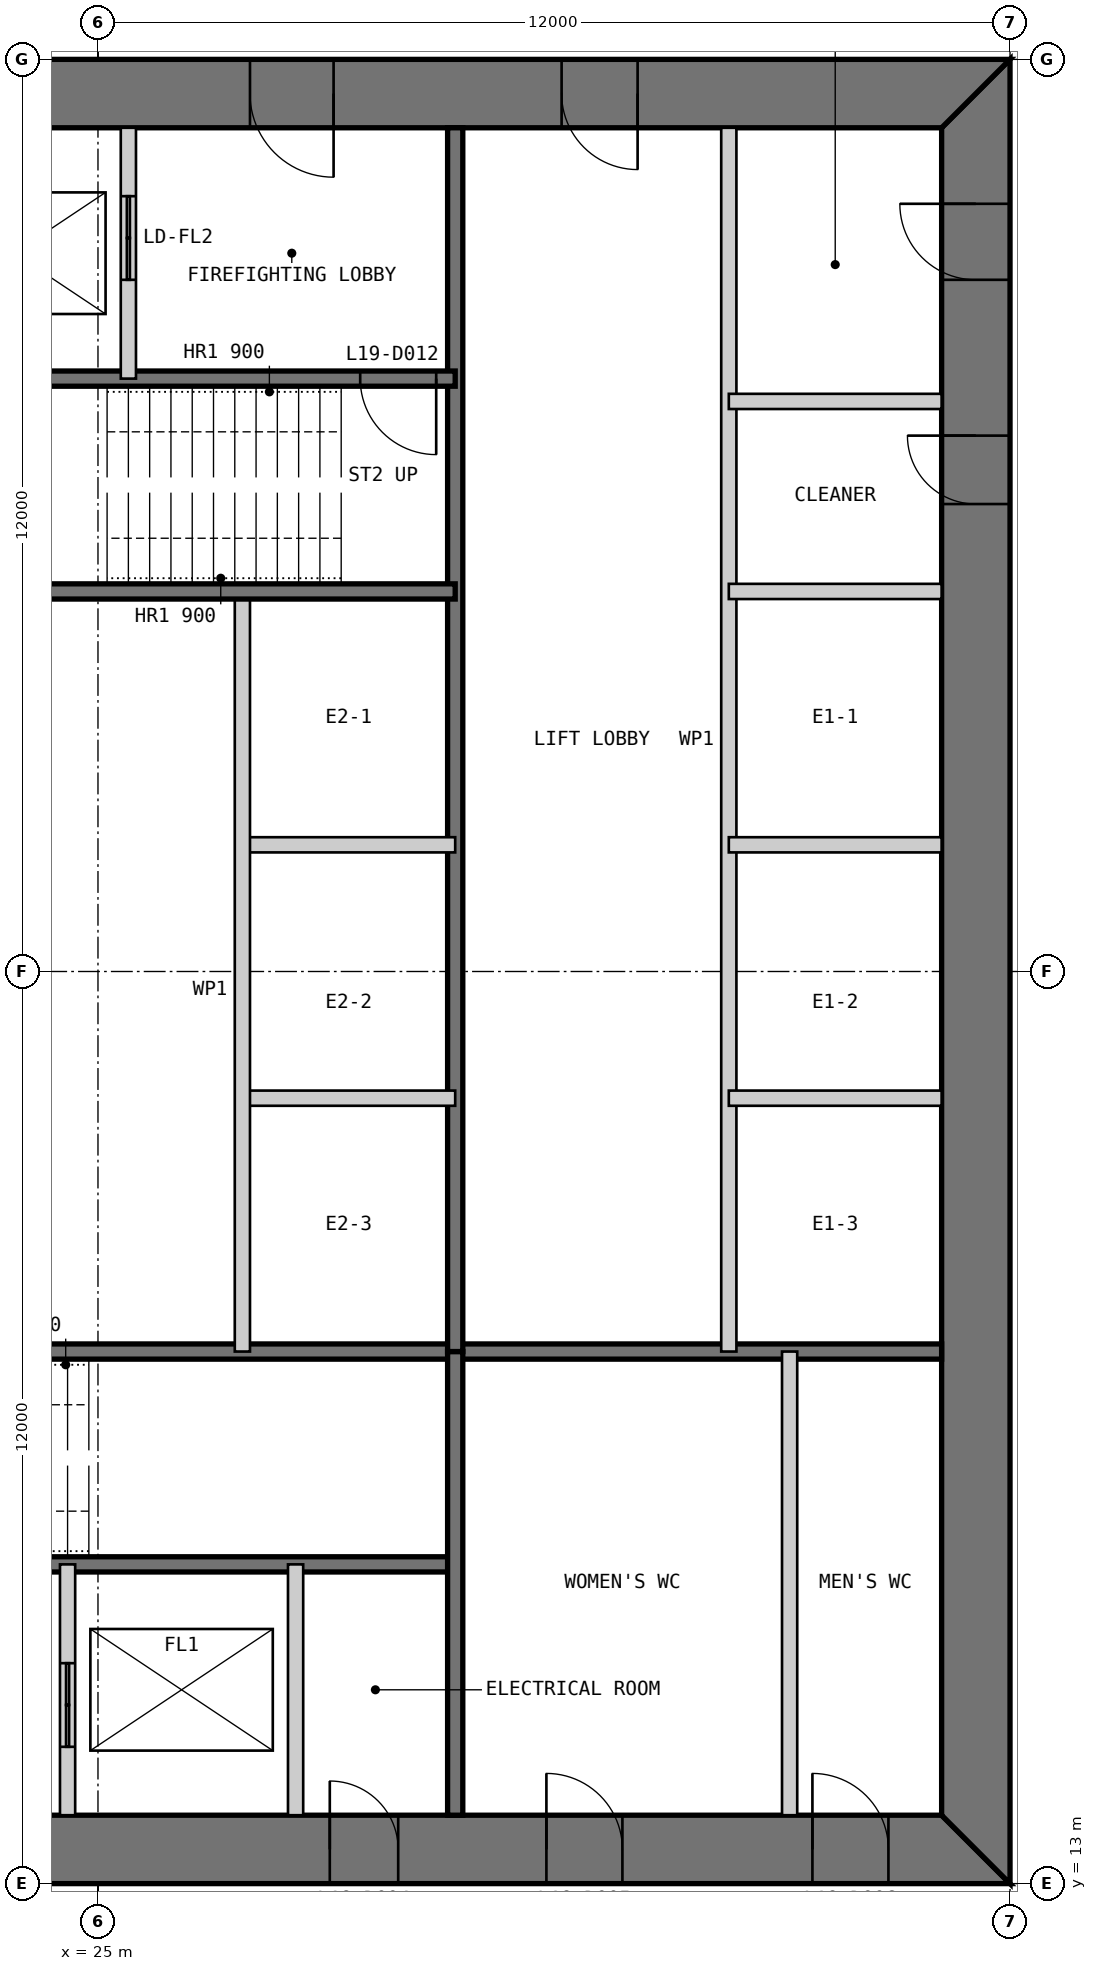
"""IFC4 building model, lengths in metres.
Left out: names, types, materials, properties, quantities, classifications, styles, units other than length and angle.
Written with IfcOpenShell. Run it as: python <this file> out.ifc"""

import sys

from ifc_helpers import new_model, si_unit, direction, frame, frame_2d, origin, place, context, subcontext, project, spatial, polyline, rectangle, outline, extrude, element, fill, save


model = new_model("IFC4")
c1 = context("Model", 3, precision=1e-05, world=origin(), true_north=direction((0.0, 1.0)))
c2 = subcontext(c1, "Body", "Model", "MODEL_VIEW")
j1 = project(units=[si_unit("LENGTHUNIT", "METRE"), si_unit("PLANEANGLEUNIT", "RADIAN")], contexts=[c1])
p1 = place(None, origin())
s1 = spatial("IfcSite", under=j1, at=p1, CompositionType="ELEMENT")
p2 = place(p1, origin())
s2 = spatial("IfcBuilding", under=s1, at=p2, CompositionType="ELEMENT")
p3 = place(p2, frame((0.0, 0.0, 83.0)))
s3 = spatial("IfcBuildingStorey", under=s2, at=p3, CompositionType="ELEMENT", Elevation=83.0)
p4 = place(p3, frame((13.0, 13.45, 0.0), z_axis=(0.0, 0.0, 1.0), x_axis=(1.0, 0.0, 0.0)))
e1 = element("IfcWall", 1, at=p4, inside=s3, PredefinedType="SHEAR", context=c2, shape_type="SweptSolid", body=[
    extrude(outline(polyline([(0.0, -0.45), (24.0, -0.45), (23.1, 0.45), (0.9, 0.45), (0.0, -0.45)])), origin(), (0.0, 0.0, 1.0), 4.0),
])
p5 = place(p4, frame((4.9, 0.0, 0.0)))
e2 = element("IfcOpeningElement", 2, at=p5, cuts=e1, PredefinedType="OPENING", context=c2, shape_type="SweptSolid", body=[
    extrude(rectangle(XDim=1.0, YDim=2.2, at=frame_2d((0.5, 1.1))), frame((0.0, 0.46, 0.0), z_axis=(0.0, -1.0, 0.0), x_axis=(1.0, 0.0, 0.0)), (0.0, 0.0, 1.0), 0.92),
])
p6 = place(p4, frame((8.9, 0.0, 0.0)))
e3 = element("IfcOpeningElement", 3, at=p6, cuts=e1, PredefinedType="OPENING", context=c2, shape_type="SweptSolid", body=[
    extrude(rectangle(XDim=1.1, YDim=2.2, at=frame_2d((0.55, 1.1))), frame((0.0, 0.46, 0.0), z_axis=(0.0, -1.0, 0.0), x_axis=(1.0, 0.0, 0.0)), (0.0, 0.0, 1.0), 0.92),
])
p7 = place(p4, frame((15.05, 0.0, 0.0)))
e4 = element("IfcOpeningElement", 4, at=p7, cuts=e1, PredefinedType="OPENING", context=c2, shape_type="SweptSolid", body=[
    extrude(rectangle(XDim=0.9, YDim=2.2, at=frame_2d((0.45, 1.1))), frame((0.0, 0.46, 0.0), z_axis=(0.0, -1.0, 0.0), x_axis=(1.0, 0.0, 0.0)), (0.0, 0.0, 1.0), 0.92),
])
p8 = place(p4, frame((17.9, 0.0, 0.0)))
e5 = element("IfcOpeningElement", 5, at=p8, cuts=e1, PredefinedType="OPENING", context=c2, shape_type="SweptSolid", body=[
    extrude(rectangle(XDim=1.0, YDim=2.2, at=frame_2d((0.5, 1.1))), frame((0.0, 0.46, 0.0), z_axis=(0.0, -1.0, 0.0), x_axis=(1.0, 0.0, 0.0)), (0.0, 0.0, 1.0), 0.92),
])
p9 = place(p4, frame((21.4, 0.0, 0.0)))
e6 = element("IfcOpeningElement", 6, at=p9, cuts=e1, PredefinedType="OPENING", context=c2, shape_type="SweptSolid", body=[
    extrude(rectangle(XDim=1.0, YDim=2.2, at=frame_2d((0.5, 1.1))), frame((0.0, 0.46, 0.0), z_axis=(0.0, -1.0, 0.0), x_axis=(1.0, 0.0, 0.0)), (0.0, 0.0, 1.0), 0.92),
])
p10 = place(p3, frame((36.55, 13.9, 0.0), z_axis=(0.0, 0.0, 1.0), x_axis=(0.0, 1.0, 0.0)))
e7 = element("IfcWall", 7, at=p10, inside=s3, PredefinedType="SHEAR", context=c2, shape_type="SweptSolid", body=[
    extrude(outline(polyline([(-0.9, -0.45), (23.1, -0.45), (22.2, 0.45), (0.0, 0.45), (-0.9, -0.45)])), origin(), (0.0, 0.0, 1.0), 4.0),
])
p11 = place(p10, frame((20.2, 0.0, 0.0)))
e8 = element("IfcOpeningElement", 8, at=p11, cuts=e7, PredefinedType="OPENING", context=c2, shape_type="SweptSolid", body=[
    extrude(rectangle(XDim=1.0, YDim=2.2, at=frame_2d((0.5, 1.1))), frame((0.0, 0.46, 0.0), z_axis=(0.0, -1.0, 0.0), x_axis=(1.0, 0.0, 0.0)), (0.0, 0.0, 1.0), 0.92),
])
p12 = place(p10, frame((17.25, 0.0, 0.0)))
e9 = element("IfcOpeningElement", 9, at=p12, cuts=e7, PredefinedType="OPENING", context=c2, shape_type="SweptSolid", body=[
    extrude(rectangle(XDim=0.9, YDim=2.2, at=frame_2d((0.45, 1.1))), frame((0.0, 0.46, 0.0), z_axis=(0.0, -1.0, 0.0), x_axis=(1.0, 0.0, 0.0)), (0.0, 0.0, 1.0), 0.92),
])
p13 = place(p3, frame((37.0, 36.55, 0.0), z_axis=(0.0, 0.0, 1.0), x_axis=(-1.0, 0.0, 0.0)))
e10 = element("IfcWall", 10, at=p13, inside=s3, PredefinedType="SHEAR", context=c2, shape_type="SweptSolid", body=[
    extrude(outline(polyline([(0.0, -0.45), (24.0, -0.45), (23.1, 0.45), (0.9, 0.45), (0.0, -0.45)])), origin(), (0.0, 0.0, 1.0), 4.0),
])
p14 = place(p13, frame((4.9, 0.0, 0.0)))
e11 = element("IfcOpeningElement", 11, at=p14, cuts=e10, PredefinedType="OPENING", context=c2, shape_type="SweptSolid", body=[
    extrude(rectangle(XDim=1.0, YDim=2.2, at=frame_2d((0.5, 1.1))), frame((0.0, 0.46, 0.0), z_axis=(0.0, -1.0, 0.0), x_axis=(1.0, 0.0, 0.0)), (0.0, 0.0, 1.0), 0.92),
])
p15 = place(p13, frame((8.9, 0.0, 0.0)))
e12 = element("IfcOpeningElement", 12, at=p15, cuts=e10, PredefinedType="OPENING", context=c2, shape_type="SweptSolid", body=[
    extrude(rectangle(XDim=1.1, YDim=2.2, at=frame_2d((0.55, 1.1))), frame((0.0, 0.46, 0.0), z_axis=(0.0, -1.0, 0.0), x_axis=(1.0, 0.0, 0.0)), (0.0, 0.0, 1.0), 0.92),
])
p16 = place(p13, frame((15.05, 0.0, 0.0)))
e13 = element("IfcOpeningElement", 13, at=p16, cuts=e10, PredefinedType="OPENING", context=c2, shape_type="SweptSolid", body=[
    extrude(rectangle(XDim=0.9, YDim=2.2, at=frame_2d((0.45, 1.1))), frame((0.0, 0.46, 0.0), z_axis=(0.0, -1.0, 0.0), x_axis=(1.0, 0.0, 0.0)), (0.0, 0.0, 1.0), 0.92),
])
p17 = place(p13, frame((17.9, 0.0, 0.0)))
e14 = element("IfcOpeningElement", 14, at=p17, cuts=e10, PredefinedType="OPENING", context=c2, shape_type="SweptSolid", body=[
    extrude(rectangle(XDim=1.0, YDim=2.2, at=frame_2d((0.5, 1.1))), frame((0.0, 0.46, 0.0), z_axis=(0.0, -1.0, 0.0), x_axis=(1.0, 0.0, 0.0)), (0.0, 0.0, 1.0), 0.92),
])
p18 = place(p13, frame((21.4, 0.0, 0.0)))
e15 = element("IfcOpeningElement", 15, at=p18, cuts=e10, PredefinedType="OPENING", context=c2, shape_type="SweptSolid", body=[
    extrude(rectangle(XDim=1.0, YDim=2.2, at=frame_2d((0.5, 1.1))), frame((0.0, 0.46, 0.0), z_axis=(0.0, -1.0, 0.0), x_axis=(1.0, 0.0, 0.0)), (0.0, 0.0, 1.0), 0.92),
])
p19 = place(p3, frame((20.3, 17.2, 0.0), z_axis=(0.0, 0.0, 1.0), x_axis=(1.0, 0.0, 0.0)))
e16 = element("IfcWall", 16, at=p19, inside=s3, PredefinedType="SOLIDWALL", context=c2, shape_type="SweptSolid", body=[
    extrude(rectangle(XDim=9.4, YDim=0.2, at=frame_2d((4.7, 0.0))), origin(), (0.0, 0.0, 1.0), 3.8),
])
p20 = place(p19, frame((0.25, 0.0, 0.0)))
e17 = element("IfcOpeningElement", 17, at=p20, cuts=e16, PredefinedType="OPENING", context=c2, shape_type="SweptSolid", body=[
    extrude(rectangle(XDim=1.0, YDim=2.2, at=frame_2d((0.5, 1.1))), frame((0.0, 0.11, 0.0), z_axis=(0.0, -1.0, 0.0), x_axis=(1.0, 0.0, 0.0)), (0.0, 0.0, 1.0), 0.22),
])
p21 = place(p3, frame((20.3, 20.0, 0.0), z_axis=(0.0, 0.0, 1.0), x_axis=(1.0, 0.0, 0.0)))
e18 = element("IfcWall", 18, at=p21, inside=s3, PredefinedType="SOLIDWALL", context=c2, shape_type="SweptSolid", body=[
    extrude(rectangle(XDim=15.8, YDim=0.2, at=frame_2d((7.9, 0.0))), origin(), (0.0, 0.0, 1.0), 3.8),
])
p22 = place(p3, frame((24.6, 13.9, 0.0), z_axis=(0.0, 0.0, 1.0), x_axis=(0.0, 1.0, 0.0)))
e19 = element("IfcWall", 19, at=p22, inside=s3, PredefinedType="PARTITIONING", context=c2, shape_type="SweptSolid", body=[
    extrude(rectangle(XDim=3.3, YDim=0.2, at=frame_2d((1.65, 0.0))), origin(), (0.0, 0.0, 1.0), 3.8),
])
p23 = place(p22, frame((0.9, 0.0, 0.0)))
e20 = element("IfcOpeningElement", 20, at=p23, cuts=e19, PredefinedType="OPENING", context=c2, shape_type="SweptSolid", body=[
    extrude(rectangle(XDim=1.1, YDim=2.2, at=frame_2d((0.55, 1.1))), frame((0.0, 0.11, 0.0), z_axis=(0.0, -1.0, 0.0), x_axis=(1.0, 0.0, 0.0)), (0.0, 0.0, 1.0), 0.22),
])
p24 = place(p3, frame((27.6, 13.9, 0.0), z_axis=(0.0, 0.0, 1.0), x_axis=(0.0, 1.0, 0.0)))
e21 = element("IfcWall", 21, at=p24, inside=s3, PredefinedType="PARTITIONING", context=c2, shape_type="SweptSolid", body=[
    extrude(rectangle(XDim=3.3, YDim=0.2, at=frame_2d((1.65, 0.0))), origin(), (0.0, 0.0, 1.0), 3.8),
])
p25 = place(p3, frame((29.7, 13.9, 0.0), z_axis=(0.0, 0.0, 1.0), x_axis=(0.0, 1.0, 0.0)))
e22 = element("IfcWall", 22, at=p25, inside=s3, PredefinedType="SOLIDWALL", context=c2, shape_type="SweptSolid", body=[
    extrude(rectangle(XDim=6.1, YDim=0.2, at=frame_2d((3.05, 0.0))), origin(), (0.0, 0.0, 1.0), 3.8),
])
p26 = place(p3, frame((34.1, 13.9, 0.0), z_axis=(0.0, 0.0, 1.0), x_axis=(0.0, 1.0, 0.0)))
e23 = element("IfcWall", 23, at=p26, inside=s3, PredefinedType="PARTITIONING", context=c2, shape_type="SweptSolid", body=[
    extrude(rectangle(XDim=6.1, YDim=0.2, at=frame_2d((3.05, 0.0))), origin(), (0.0, 0.0, 1.0), 3.8),
])
p27 = place(p3, frame((33.3, 36.1, 0.0), z_axis=(0.0, 0.0, 1.0), x_axis=(0.0, -1.0, 0.0)))
e24 = element("IfcWall", 24, at=p27, inside=s3, PredefinedType="PARTITIONING", context=c2, shape_type="SweptSolid", body=[
    extrude(rectangle(XDim=16.1, YDim=0.2, at=frame_2d((8.05, 0.0))), origin(), (0.0, 0.0, 1.0), 3.8),
])
p28 = place(p3, frame((29.7, 36.1, 0.0), z_axis=(0.0, 0.0, 1.0), x_axis=(0.0, -1.0, 0.0)))
e25 = element("IfcWall", 25, at=p28, inside=s3, PredefinedType="SOLIDWALL", context=c2, shape_type="SweptSolid", body=[
    extrude(rectangle(XDim=16.1, YDim=0.2, at=frame_2d((8.05, 0.0))), origin(), (0.0, 0.0, 1.0), 3.8),
])
for number, where, z_axis, x_axis in (
    (26, (36.1, 30.0, 0.0), (0.0, 0.0, 1.0), (-1.0, 0.0, 0.0)),
    (27, (36.1, 26.667, 0.0), (0.0, 0.0, 1.0), (-1.0, 0.0, 0.0)),
    (28, (36.1, 23.333, 0.0), (0.0, 0.0, 1.0), (-1.0, 0.0, 0.0)),
    (29, (29.7, 26.667, 0.0), (0.0, 0.0, 1.0), (-1.0, 0.0, 0.0)),
    (30, (29.7, 23.333, 0.0), (0.0, 0.0, 1.0), (-1.0, 0.0, 0.0)),
):
    element("IfcWall", number, at=place(p3, frame(where, z_axis=z_axis, x_axis=x_axis)), inside=s3, PredefinedType="PARTITIONING", context=c2, shape_type="SweptSolid", body=[
        extrude(rectangle(XDim=2.8, YDim=0.2, at=frame_2d((1.4, 0.0))), origin(), (0.0, 0.0, 1.0), 3.8),
    ])
p29 = place(p3, frame((26.9, 30.0, 0.0), z_axis=(0.0, 0.0, 1.0), x_axis=(0.0, -1.0, 0.0)))
e31 = element("IfcWall", 31, at=p29, inside=s3, PredefinedType="PARTITIONING", context=c2, shape_type="SweptSolid", body=[
    extrude(rectangle(XDim=10.0, YDim=0.2, at=frame_2d((5.0, 0.0))), origin(), (0.0, 0.0, 1.0), 3.8),
])
p30 = place(p3, frame((29.7, 32.8, 0.0), z_axis=(0.0, 0.0, 1.0), x_axis=(-1.0, 0.0, 0.0)))
e32 = element("IfcWall", 32, at=p30, inside=s3, PredefinedType="SOLIDWALL", context=c2, shape_type="SweptSolid", body=[
    extrude(rectangle(XDim=9.4, YDim=0.2, at=frame_2d((4.7, 0.0))), origin(), (0.0, 0.0, 1.0), 3.8),
])
p31 = place(p30, frame((0.25, 0.0, 0.0)))
e33 = element("IfcOpeningElement", 33, at=p31, cuts=e32, PredefinedType="OPENING", context=c2, shape_type="SweptSolid", body=[
    extrude(rectangle(XDim=1.0, YDim=2.2, at=frame_2d((0.5, 1.1))), frame((0.0, 0.11, 0.0), z_axis=(0.0, -1.0, 0.0), x_axis=(1.0, 0.0, 0.0)), (0.0, 0.0, 1.0), 0.22),
])
p32 = place(p3, frame((29.7, 30.0, 0.0), z_axis=(0.0, 0.0, 1.0), x_axis=(-1.0, 0.0, 0.0)))
e34 = element("IfcWall", 34, at=p32, inside=s3, PredefinedType="SOLIDWALL", context=c2, shape_type="SweptSolid", body=[
    extrude(rectangle(XDim=15.8, YDim=0.2, at=frame_2d((7.9, 0.0))), origin(), (0.0, 0.0, 1.0), 3.8),
])
p33 = place(p3, frame((25.4, 36.1, 0.0), z_axis=(0.0, 0.0, 1.0), x_axis=(0.0, -1.0, 0.0)))
e35 = element("IfcWall", 35, at=p33, inside=s3, PredefinedType="PARTITIONING", context=c2, shape_type="SweptSolid", body=[
    extrude(rectangle(XDim=3.3, YDim=0.2, at=frame_2d((1.65, 0.0))), origin(), (0.0, 0.0, 1.0), 3.8),
])
p34 = place(p33, frame((0.9, 0.0, 0.0)))
e36 = element("IfcOpeningElement", 36, at=p34, cuts=e35, PredefinedType="OPENING", context=c2, shape_type="SweptSolid", body=[
    extrude(rectangle(XDim=1.1, YDim=2.2, at=frame_2d((0.55, 1.1))), frame((0.0, 0.11, 0.0), z_axis=(0.0, -1.0, 0.0), x_axis=(1.0, 0.0, 0.0)), (0.0, 0.0, 1.0), 0.22),
])
p35 = place(p3, frame((36.1, 32.5, 0.0), z_axis=(0.0, 0.0, 1.0), x_axis=(-1.0, 0.0, 0.0)))
e37 = element("IfcWall", 37, at=p35, inside=s3, PredefinedType="PARTITIONING", context=c2, shape_type="SweptSolid", body=[
    extrude(rectangle(XDim=2.8, YDim=0.2, at=frame_2d((1.4, 0.0))), origin(), (0.0, 0.0, 1.0), 3.8),
])
p36 = place(p7, origin())
e38 = element("IfcDoor", 38, at=p36, inside=s3, OperationType="SINGLE_SWING_LEFT", PredefinedType="DOOR", context=c2, shape_type="SweptSolid", body=[
    extrude(rectangle(XDim=0.9, YDim=2.2, at=frame_2d((0.45, 1.1))), frame((0.0, 0.025, 0.0), z_axis=(0.0, -1.0, 0.0), x_axis=(1.0, 0.0, 0.0)), (0.0, 0.0, 1.0), 0.05),
    extrude(outline(polyline([(0.0, 0.0), (0.04, 0.0), (0.04, 2.16), (0.86, 2.16), (0.86, 0.0), (0.9, 0.0), (0.9, 2.2), (0.0, 2.2), (0.0, 0.0)])), frame((0.0, 0.3, 0.0), z_axis=(0.0, -1.0, 0.0), x_axis=(1.0, 0.0, 0.0)), (0.0, 0.0, 1.0), 0.6),
])
fill(e4, e38)
p37 = place(p8, origin())
e39 = element("IfcDoor", 39, at=p37, inside=s3, OperationType="SINGLE_SWING_LEFT", PredefinedType="DOOR", context=c2, shape_type="SweptSolid", body=[
    extrude(rectangle(XDim=1.0, YDim=2.2, at=frame_2d((0.5, 1.1))), frame((0.0, 0.025, 0.0), z_axis=(0.0, -1.0, 0.0), x_axis=(1.0, 0.0, 0.0)), (0.0, 0.0, 1.0), 0.05),
    extrude(outline(polyline([(0.0, 0.0), (0.04, 0.0), (0.04, 2.16), (0.96, 2.16), (0.96, 0.0), (1.0, 0.0), (1.0, 2.2), (0.0, 2.2), (0.0, 0.0)])), frame((0.0, 0.3, 0.0), z_axis=(0.0, -1.0, 0.0), x_axis=(1.0, 0.0, 0.0)), (0.0, 0.0, 1.0), 0.6),
])
fill(e5, e39)
p38 = place(p9, origin())
e40 = element("IfcDoor", 40, at=p38, inside=s3, OperationType="SINGLE_SWING_LEFT", PredefinedType="DOOR", context=c2, shape_type="SweptSolid", body=[
    extrude(rectangle(XDim=1.0, YDim=2.2, at=frame_2d((0.5, 1.1))), frame((0.0, 0.025, 0.0), z_axis=(0.0, -1.0, 0.0), x_axis=(1.0, 0.0, 0.0)), (0.0, 0.0, 1.0), 0.05),
    extrude(outline(polyline([(0.0, 0.0), (0.04, 0.0), (0.04, 2.16), (0.96, 2.16), (0.96, 0.0), (1.0, 0.0), (1.0, 2.2), (0.0, 2.2), (0.0, 0.0)])), frame((0.0, 0.3, 0.0), z_axis=(0.0, -1.0, 0.0), x_axis=(1.0, 0.0, 0.0)), (0.0, 0.0, 1.0), 0.6),
])
fill(e6, e40)
p39 = place(p14, origin())
e41 = element("IfcDoor", 41, at=p39, inside=s3, OperationType="SINGLE_SWING_LEFT", PredefinedType="DOOR", context=c2, shape_type="SweptSolid", body=[
    extrude(rectangle(XDim=1.0, YDim=2.2, at=frame_2d((0.5, 1.1))), frame((0.0, 0.025, 0.0), z_axis=(0.0, -1.0, 0.0), x_axis=(1.0, 0.0, 0.0)), (0.0, 0.0, 1.0), 0.05),
    extrude(outline(polyline([(0.0, 0.0), (0.04, 0.0), (0.04, 2.16), (0.96, 2.16), (0.96, 0.0), (1.0, 0.0), (1.0, 2.2), (0.0, 2.2), (0.0, 0.0)])), frame((0.0, 0.3, 0.0), z_axis=(0.0, -1.0, 0.0), x_axis=(1.0, 0.0, 0.0)), (0.0, 0.0, 1.0), 0.6),
])
fill(e11, e41)
p40 = place(p15, origin())
e42 = element("IfcDoor", 42, at=p40, inside=s3, OperationType="SINGLE_SWING_LEFT", PredefinedType="DOOR", context=c2, shape_type="SweptSolid", body=[
    extrude(rectangle(XDim=1.1, YDim=2.2, at=frame_2d((0.55, 1.1))), frame((0.0, 0.025, 0.0), z_axis=(0.0, -1.0, 0.0), x_axis=(1.0, 0.0, 0.0)), (0.0, 0.0, 1.0), 0.05),
    extrude(outline(polyline([(0.0, 0.0), (0.04, 0.0), (0.04, 2.16), (1.06, 2.16), (1.06, 0.0), (1.1, 0.0), (1.1, 2.2), (0.0, 2.2), (0.0, 0.0)])), frame((0.0, 0.3, 0.0), z_axis=(0.0, -1.0, 0.0), x_axis=(1.0, 0.0, 0.0)), (0.0, 0.0, 1.0), 0.6),
])
fill(e12, e42)
p41 = place(p31, origin())
e43 = element("IfcDoor", 43, at=p41, inside=s3, OperationType="SINGLE_SWING_LEFT", PredefinedType="DOOR", context=c2, shape_type="SweptSolid", body=[
    extrude(rectangle(XDim=1.0, YDim=2.2, at=frame_2d((0.5, 1.1))), frame((0.0, 0.025, 0.0), z_axis=(0.0, -1.0, 0.0), x_axis=(1.0, 0.0, 0.0)), (0.0, 0.0, 1.0), 0.05),
])
fill(e33, e43)
p42 = place(p11, origin())
e44 = element("IfcDoor", 44, at=p42, inside=s3, OperationType="SINGLE_SWING_RIGHT", PredefinedType="DOOR", context=c2, shape_type="SweptSolid", body=[
    extrude(rectangle(XDim=1.0, YDim=2.2, at=frame_2d((0.5, 1.1))), frame((0.0, 0.025, 0.0), z_axis=(0.0, -1.0, 0.0), x_axis=(1.0, 0.0, 0.0)), (0.0, 0.0, 1.0), 0.05),
    extrude(outline(polyline([(0.0, 0.0), (0.04, 0.0), (0.04, 2.16), (0.96, 2.16), (0.96, 0.0), (1.0, 0.0), (1.0, 2.2), (0.0, 2.2), (0.0, 0.0)])), frame((0.0, 0.3, 0.0), z_axis=(0.0, -1.0, 0.0), x_axis=(1.0, 0.0, 0.0)), (0.0, 0.0, 1.0), 0.6),
])
fill(e8, e44)
p43 = place(p12, origin())
e45 = element("IfcDoor", 45, at=p43, inside=s3, OperationType="SINGLE_SWING_RIGHT", PredefinedType="DOOR", context=c2, shape_type="SweptSolid", body=[
    extrude(rectangle(XDim=0.9, YDim=2.2, at=frame_2d((0.45, 1.1))), frame((0.0, 0.025, 0.0), z_axis=(0.0, -1.0, 0.0), x_axis=(1.0, 0.0, 0.0)), (0.0, 0.0, 1.0), 0.05),
    extrude(outline(polyline([(0.0, 0.0), (0.04, 0.0), (0.04, 2.16), (0.86, 2.16), (0.86, 0.0), (0.9, 0.0), (0.9, 2.2), (0.0, 2.2), (0.0, 0.0)])), frame((0.0, 0.3, 0.0), z_axis=(0.0, -1.0, 0.0), x_axis=(1.0, 0.0, 0.0)), (0.0, 0.0, 1.0), 0.6),
])
fill(e9, e45)
p44 = place(p23, origin())
e46 = element("IfcDoor", 46, at=p44, inside=s3, OperationType="DOUBLE_DOOR_SLIDING", PredefinedType="DOOR", context=c2, shape_type="SweptSolid", body=[
    extrude(rectangle(XDim=1.1, YDim=2.2, at=frame_2d((0.55, 1.1))), frame((0.0, 0.025, 0.0), z_axis=(0.0, -1.0, 0.0), x_axis=(1.0, 0.0, 0.0)), (0.0, 0.0, 1.0), 0.05),
])
fill(e20, e46)
p45 = place(p34, origin())
e47 = element("IfcDoor", 47, at=p45, inside=s3, OperationType="DOUBLE_DOOR_SLIDING", PredefinedType="DOOR", context=c2, shape_type="SweptSolid", body=[
    extrude(rectangle(XDim=1.1, YDim=2.2, at=frame_2d((0.55, 1.1))), frame((0.0, 0.025, 0.0), z_axis=(0.0, -1.0, 0.0), x_axis=(1.0, 0.0, 0.0)), (0.0, 0.0, 1.0), 0.05),
])
fill(e36, e47)
save(model, sys.argv[1])
